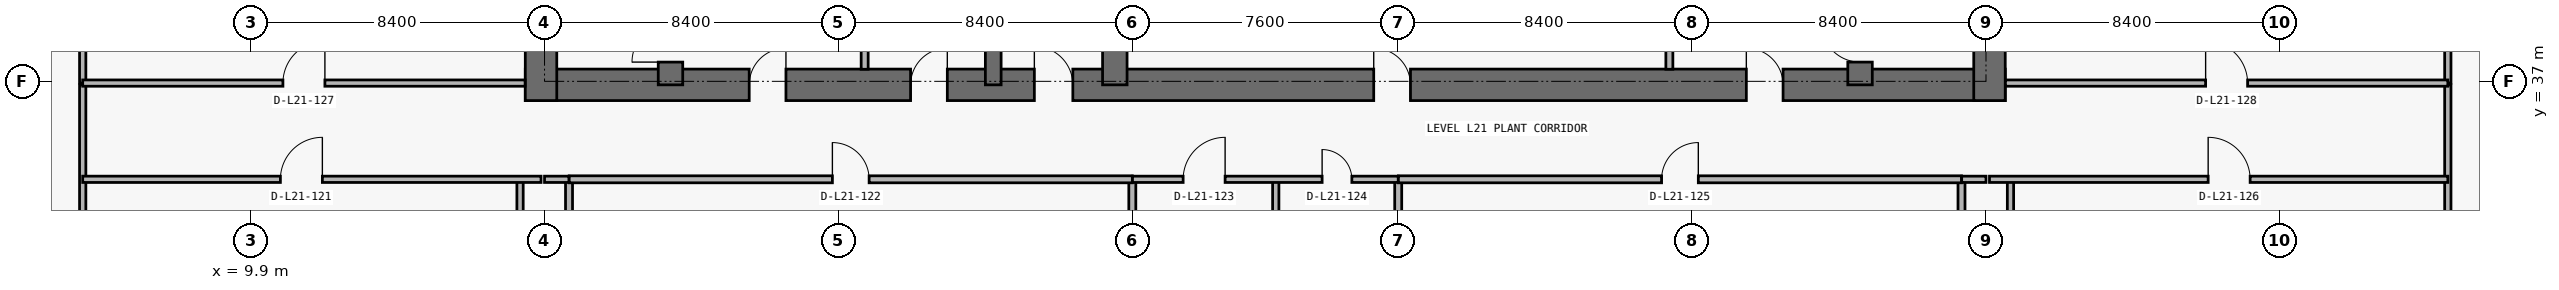
"""IFC4 building model, lengths in metres.
Left out: names, types, materials, properties, quantities, classifications, styles, units other than length and angle.
Written with IfcOpenShell. Run it as: python <this file> out.ifc"""

import sys

from ifc_helpers import new_model, si_unit, direction, frame, frame_2d, origin, place, context, subcontext, project, spatial, rectangle, extrude, element, fill, save


model = new_model("IFC4")
c1 = context("Model", 3, precision=1e-05, world=origin(), true_north=direction((0.0, 1.0)))
c2 = subcontext(c1, "Body", "Model", "MODEL_VIEW")
j1 = project(units=[si_unit("LENGTHUNIT", "METRE"), si_unit("PLANEANGLEUNIT", "RADIAN")], contexts=[c1])
p1 = place(None, origin())
s1 = spatial("IfcSite", under=j1, at=p1, CompositionType="ELEMENT")
p2 = place(p1, origin())
s2 = spatial("IfcBuilding", under=s1, at=p2, CompositionType="ELEMENT")
p3 = place(p2, frame((0.0, 0.0, 79.5)))
s3 = spatial("IfcBuildingStorey", under=s2, at=p3, CompositionType="ELEMENT", Elevation=79.5)
p4 = place(p3, frame((17.75, 36.9, 0.0), z_axis=(0.0, 0.0, 1.0), x_axis=(1.0, 0.0, 0.0)))
e1 = element("IfcWall", 1, at=p4, inside=s3, PredefinedType="SHEAR", context=c2, shape_type="SweptSolid", body=[
    extrude(rectangle(XDim=42.3, YDim=0.9, at=frame_2d((21.15, 0.0))), origin(), (0.0, 0.0, 1.0), 4.85),
])
p5 = place(p4, frame((14.55, 0.0, 0.0)))
e2 = element("IfcOpeningElement", 2, at=p5, cuts=e1, PredefinedType="OPENING", context=c2, shape_type="SweptSolid", body=[
    extrude(rectangle(XDim=1.1, YDim=2.15, at=frame_2d((0.55, 1.075))), frame((0.0, 0.46, 0.0), z_axis=(0.0, -1.0, 0.0), x_axis=(1.0, 0.0, 0.0)), (0.0, 0.0, 1.0), 0.92),
])
p6 = place(p4, frame((6.4, 0.0, 0.0)))
e3 = element("IfcOpeningElement", 3, at=p6, cuts=e1, PredefinedType="OPENING", context=c2, shape_type="SweptSolid", body=[
    extrude(rectangle(XDim=1.05, YDim=2.15, at=frame_2d((0.525, 1.075))), frame((0.0, 0.46, 0.0), z_axis=(0.0, -1.0, 0.0), x_axis=(1.0, 0.0, 0.0)), (0.0, 0.0, 1.0), 0.92),
])
p7 = place(p4, frame((34.9, 0.0, 0.0)))
e4 = element("IfcOpeningElement", 4, at=p7, cuts=e1, PredefinedType="OPENING", context=c2, shape_type="SweptSolid", body=[
    extrude(rectangle(XDim=1.05, YDim=2.15, at=frame_2d((0.525, 1.075))), frame((0.0, 0.46, 0.0), z_axis=(0.0, -1.0, 0.0), x_axis=(1.0, 0.0, 0.0)), (0.0, 0.0, 1.0), 0.92),
])
p8 = place(p4, frame((11.012, 0.0, 0.0)))
e5 = element("IfcOpeningElement", 5, at=p8, cuts=e1, PredefinedType="OPENING", context=c2, shape_type="SweptSolid", body=[
    extrude(rectangle(XDim=1.05, YDim=2.15, at=frame_2d((0.525, 1.075))), frame((0.0, 0.46, 0.0), z_axis=(0.0, -1.0, 0.0), x_axis=(1.0, 0.0, 0.0)), (0.0, 0.0, 1.0), 0.92),
])
p9 = place(p4, frame((24.25, 0.0, 0.0)))
e6 = element("IfcOpeningElement", 6, at=p9, cuts=e1, PredefinedType="OPENING", context=c2, shape_type="SweptSolid", body=[
    extrude(rectangle(XDim=1.05, YDim=2.15, at=frame_2d((0.525, 1.075))), frame((0.0, 0.46, 0.0), z_axis=(0.0, -1.0, 0.0), x_axis=(1.0, 0.0, 0.0)), (0.0, 0.0, 1.0), 0.92),
])
for number, where, z_axis, x_axis in (
    (7, (18.2, 36.45, 0.0), (0.0, 0.0, 1.0), (0.0, 1.0, 0.0)),
    (8, (59.6, 36.45, 0.0), (0.0, 0.0, 1.0), (0.0, 1.0, 0.0)),
):
    element("IfcWall", number, at=place(p3, frame(where, z_axis=z_axis, x_axis=x_axis)), inside=s3, PredefinedType="SHEAR", context=c2, shape_type="SweptSolid", body=[
        extrude(rectangle(XDim=14.15, YDim=0.9, at=frame_2d((7.075, 0.0))), origin(), (0.0, 0.0, 1.0), 4.85),
    ])
p10 = place(p3, frame((21.9, 36.9, 0.0), z_axis=(0.0, 0.0, 1.0), x_axis=(0.0, 1.0, 0.0)))
e9 = element("IfcWall", 9, at=p10, inside=s3, PredefinedType="SHEAR", context=c2, shape_type="SweptSolid", body=[
    extrude(rectangle(XDim=9.675, YDim=0.7, at=frame_2d((4.837, 0.0))), origin(), (0.0, 0.0, 1.0), 4.85),
])
p11 = place(p10, frame((0.65, 0.0, 0.0)))
e10 = element("IfcOpeningElement", 10, at=p11, cuts=e9, PredefinedType="OPENING", context=c2, shape_type="SweptSolid", body=[
    extrude(rectangle(XDim=1.1, YDim=2.15, at=frame_2d((0.55, 1.075))), frame((0.0, 0.36, 0.0), z_axis=(0.0, -1.0, 0.0), x_axis=(1.0, 0.0, 0.0)), (0.0, 0.0, 1.0), 0.72),
])
p12 = place(p3, frame((55.9, 36.9, 0.0), z_axis=(0.0, 0.0, 1.0), x_axis=(0.0, 1.0, 0.0)))
e11 = element("IfcWall", 11, at=p12, inside=s3, PredefinedType="SHEAR", context=c2, shape_type="SweptSolid", body=[
    extrude(rectangle(XDim=9.675, YDim=0.7, at=frame_2d((4.837, 0.0))), origin(), (0.0, 0.0, 1.0), 4.85),
])
p13 = place(p12, frame((0.65, 0.0, 0.0)))
e12 = element("IfcOpeningElement", 12, at=p13, cuts=e11, PredefinedType="OPENING", context=c2, shape_type="SweptSolid", body=[
    extrude(rectangle(XDim=1.1, YDim=2.15, at=frame_2d((0.55, 1.075))), frame((0.0, 0.36, 0.0), z_axis=(0.0, -1.0, 0.0), x_axis=(1.0, 0.0, 0.0)), (0.0, 0.0, 1.0), 0.72),
])
p14 = place(p3, frame((31.125, 36.9, 0.0), z_axis=(0.0, 0.0, 1.0), x_axis=(0.0, 1.0, 0.0)))
e13 = element("IfcWall", 13, at=p14, inside=s3, PredefinedType="SHEAR", context=c2, shape_type="SweptSolid", body=[
    extrude(rectangle(XDim=9.675, YDim=0.45, at=frame_2d((4.837, 0.0))), origin(), (0.0, 0.0, 1.0), 4.85),
])
p15 = place(p3, frame((34.6, 36.9, 0.0), z_axis=(0.0, 0.0, 1.0), x_axis=(0.0, 1.0, 0.0)))
e14 = element("IfcWall", 14, at=p15, inside=s3, PredefinedType="SHEAR", context=c2, shape_type="SweptSolid", body=[
    extrude(rectangle(XDim=9.675, YDim=0.7, at=frame_2d((4.837, 0.0))), origin(), (0.0, 0.0, 1.0), 4.85),
])
p16 = place(p3, frame((5.1, 12.9, 0.0), z_axis=(0.0, 0.0, 1.0), x_axis=(0.0, 1.0, 0.0)))
e15 = element("IfcWall", 15, at=p16, inside=s3, PredefinedType="PARTITIONING", context=c2, shape_type="SweptSolid", body=[
    extrude(rectangle(XDim=24.0, YDim=0.18, at=frame_2d((12.0, 0.0))), origin(), (0.0, 0.0, 1.0), 4.85),
])
p17 = place(p3, frame((5.1, 36.95, 0.0), z_axis=(0.0, 0.0, 1.0), x_axis=(0.0, 1.0, 0.0)))
e16 = element("IfcWall", 16, at=p17, inside=s3, PredefinedType="PARTITIONING", context=c2, shape_type="SweptSolid", body=[
    extrude(rectangle(XDim=10.33, YDim=0.18, at=frame_2d((5.165, 0.0))), origin(), (0.0, 0.0, 1.0), 4.85),
])
p18 = place(p3, frame((17.6, 12.9, 0.0), z_axis=(0.0, 0.0, 1.0), x_axis=(0.0, 1.0, 0.0)))
e17 = element("IfcWall", 17, at=p18, inside=s3, PredefinedType="PARTITIONING", context=c2, shape_type="SweptSolid", body=[
    extrude(rectangle(XDim=21.3, YDim=0.18, at=frame_2d((10.65, 0.0))), origin(), (0.0, 0.0, 1.0), 4.85),
])
p19 = place(p3, frame((19.0, 12.9, 0.0), z_axis=(0.0, 0.0, 1.0), x_axis=(0.0, 1.0, 0.0)))
e18 = element("IfcWall", 18, at=p19, inside=s3, PredefinedType="PARTITIONING", context=c2, shape_type="SweptSolid", body=[
    extrude(rectangle(XDim=21.3, YDim=0.2, at=frame_2d((10.65, 0.0))), origin(), (0.0, 0.0, 1.0), 4.85),
])
p20 = place(p3, frame((27.45, 37.345, 0.0), z_axis=(0.0, 0.0, 1.0), x_axis=(0.0, 1.0, 0.0)))
e19 = element("IfcWall", 19, at=p20, inside=s3, PredefinedType="PARTITIONING", context=c2, shape_type="SweptSolid", body=[
    extrude(rectangle(XDim=5.385, YDim=0.2, at=frame_2d((2.692, 0.0))), origin(), (0.0, 0.0, 1.0), 4.85),
])
p21 = place(p3, frame((35.1, 12.9, 0.0), z_axis=(0.0, 0.0, 1.0), x_axis=(0.0, 1.0, 0.0)))
e20 = element("IfcWall", 20, at=p21, inside=s3, PredefinedType="PARTITIONING", context=c2, shape_type="SweptSolid", body=[
    extrude(rectangle(XDim=21.3, YDim=0.2, at=frame_2d((10.65, 0.0))), origin(), (0.0, 0.0, 1.0), 3.814),
])
p22 = place(p3, frame((39.2, 29.4, 0.0), z_axis=(0.0, 0.0, 1.0), x_axis=(0.0, 1.0, 0.0)))
e21 = element("IfcWall", 21, at=p22, inside=s3, PredefinedType="PARTITIONING", context=c2, shape_type="SweptSolid", body=[
    extrude(rectangle(XDim=4.8, YDim=0.18, at=frame_2d((2.4, 0.0))), origin(), (0.0, 0.0, 1.0), 4.85),
])
p23 = place(p3, frame((42.7, 12.9, 0.0), z_axis=(0.0, 0.0, 1.0), x_axis=(0.0, 1.0, 0.0)))
e22 = element("IfcWall", 22, at=p23, inside=s3, PredefinedType="PARTITIONING", context=c2, shape_type="SweptSolid", body=[
    extrude(rectangle(XDim=21.3, YDim=0.2, at=frame_2d((10.65, 0.0))), origin(), (0.0, 0.0, 1.0), 3.814),
])
p24 = place(p3, frame((50.45, 37.345, 0.0), z_axis=(0.0, 0.0, 1.0), x_axis=(0.0, 1.0, 0.0)))
e23 = element("IfcWall", 23, at=p24, inside=s3, PredefinedType="PARTITIONING", context=c2, shape_type="SweptSolid", body=[
    extrude(rectangle(XDim=5.385, YDim=0.2, at=frame_2d((2.692, 0.0))), origin(), (0.0, 0.0, 1.0), 4.85),
])
p25 = place(p3, frame((58.8, 12.9, 0.0), z_axis=(0.0, 0.0, 1.0), x_axis=(0.0, 1.0, 0.0)))
e24 = element("IfcWall", 24, at=p25, inside=s3, PredefinedType="PARTITIONING", context=c2, shape_type="SweptSolid", body=[
    extrude(rectangle(XDim=21.3, YDim=0.2, at=frame_2d((10.65, 0.0))), origin(), (0.0, 0.0, 1.0), 4.85),
])
p26 = place(p3, frame((60.2, 12.9, 0.0), z_axis=(0.0, 0.0, 1.0), x_axis=(0.0, 1.0, 0.0)))
e25 = element("IfcWall", 25, at=p26, inside=s3, PredefinedType="PARTITIONING", context=c2, shape_type="SweptSolid", body=[
    extrude(rectangle(XDim=21.3, YDim=0.18, at=frame_2d((10.65, 0.0))), origin(), (0.0, 0.0, 1.0), 4.85),
])
p27 = place(p3, frame((72.7, 12.9, 0.0), z_axis=(0.0, 0.0, 1.0), x_axis=(0.0, 1.0, 0.0)))
e26 = element("IfcWall", 26, at=p27, inside=s3, PredefinedType="PARTITIONING", context=c2, shape_type="SweptSolid", body=[
    extrude(rectangle(XDim=24.0, YDim=0.18, at=frame_2d((12.0, 0.0))), origin(), (0.0, 0.0, 1.0), 4.85),
])
p28 = place(p3, frame((72.7, 36.95, 0.0), z_axis=(0.0, 0.0, 1.0), x_axis=(0.0, 1.0, 0.0)))
e27 = element("IfcWall", 27, at=p28, inside=s3, PredefinedType="PARTITIONING", context=c2, shape_type="SweptSolid", body=[
    extrude(rectangle(XDim=10.33, YDim=0.18, at=frame_2d((5.165, 0.0))), origin(), (0.0, 0.0, 1.0), 4.85),
])
p29 = place(p3, frame((5.1, 34.2, 0.0), z_axis=(0.0, 0.0, 1.0), x_axis=(1.0, 0.0, 0.0)))
e28 = element("IfcWall", 28, at=p29, inside=s3, PredefinedType="PARTITIONING", context=c2, shape_type="SweptSolid", body=[
    extrude(rectangle(XDim=13.1, YDim=0.18, at=frame_2d((6.55, 0.0))), origin(), (0.0, 0.0, 1.0), 4.85),
])
p30 = place(p29, frame((5.65, 0.0, 0.0)))
e29 = element("IfcOpeningElement", 29, at=p30, cuts=e28, PredefinedType="OPENING", context=c2, shape_type="SweptSolid", body=[
    extrude(rectangle(XDim=1.2, YDim=2.2, at=frame_2d((0.6, 1.1))), frame((0.0, 0.1, 0.0), z_axis=(0.0, -1.0, 0.0), x_axis=(1.0, 0.0, 0.0)), (0.0, 0.0, 1.0), 0.2),
])
p31 = place(p3, frame((18.3, 34.2, 0.0), z_axis=(0.0, 0.0, 1.0), x_axis=(1.0, 0.0, 0.0)))
e30 = element("IfcWall", 30, at=p31, inside=s3, PredefinedType="PARTITIONING", context=c2, shape_type="SweptSolid", body=[
    extrude(rectangle(XDim=0.7, YDim=0.18, at=frame_2d((0.35, 0.0))), origin(), (0.0, 0.0, 1.0), 4.85),
])
p32 = place(p3, frame((19.005, 34.2, 0.0), z_axis=(0.0, 0.0, 1.0), x_axis=(1.0, 0.0, 0.0)))
e31 = element("IfcWall", 31, at=p32, inside=s3, PredefinedType="PARTITIONING", context=c2, shape_type="SweptSolid", body=[
    extrude(rectangle(XDim=16.095, YDim=0.2, at=frame_2d((8.048, 0.0))), origin(), (0.0, 0.0, 1.0), 4.85),
])
p33 = place(p32, frame((7.522, 0.0, 0.0)))
e32 = element("IfcOpeningElement", 32, at=p33, cuts=e31, PredefinedType="OPENING", context=c2, shape_type="SweptSolid", body=[
    extrude(rectangle(XDim=1.05, YDim=2.15, at=frame_2d((0.525, 1.075))), frame((0.0, 0.11, 0.0), z_axis=(0.0, -1.0, 0.0), x_axis=(1.0, 0.0, 0.0)), (0.0, 0.0, 1.0), 0.22),
])
p34 = place(p3, frame((35.105, 34.2, 0.0), z_axis=(0.0, 0.0, 1.0), x_axis=(1.0, 0.0, 0.0)))
e33 = element("IfcWall", 33, at=p34, inside=s3, PredefinedType="PARTITIONING", context=c2, shape_type="SweptSolid", body=[
    extrude(rectangle(XDim=7.595, YDim=0.18, at=frame_2d((3.797, 0.0))), origin(), (0.0, 0.0, 1.0), 4.85),
])
p35 = place(p34, frame((1.448, 0.0, 0.0)))
e34 = element("IfcOpeningElement", 34, at=p35, cuts=e33, PredefinedType="OPENING", context=c2, shape_type="SweptSolid", body=[
    extrude(rectangle(XDim=1.2, YDim=2.2, at=frame_2d((0.6, 1.1))), frame((0.0, 0.1, 0.0), z_axis=(0.0, -1.0, 0.0), x_axis=(1.0, 0.0, 0.0)), (0.0, 0.0, 1.0), 0.2),
])
p36 = place(p34, frame((5.42, 0.0, 0.0)))
e35 = element("IfcOpeningElement", 35, at=p36, cuts=e33, PredefinedType="OPENING", context=c2, shape_type="SweptSolid", body=[
    extrude(rectangle(XDim=0.85, YDim=2.1, at=frame_2d((0.425, 1.05))), frame((0.0, 0.1, 0.0), z_axis=(0.0, -1.0, 0.0), x_axis=(1.0, 0.0, 0.0)), (0.0, 0.0, 1.0), 0.2),
])
p37 = place(p3, frame((42.705, 34.2, 0.0), z_axis=(0.0, 0.0, 1.0), x_axis=(1.0, 0.0, 0.0)))
e36 = element("IfcWall", 36, at=p37, inside=s3, PredefinedType="PARTITIONING", context=c2, shape_type="SweptSolid", body=[
    extrude(rectangle(XDim=16.095, YDim=0.2, at=frame_2d((8.047, 0.0))), origin(), (0.0, 0.0, 1.0), 4.85),
])
p38 = place(p37, frame((7.522, 0.0, 0.0)))
e37 = element("IfcOpeningElement", 37, at=p38, cuts=e36, PredefinedType="OPENING", context=c2, shape_type="SweptSolid", body=[
    extrude(rectangle(XDim=1.05, YDim=2.15, at=frame_2d((0.525, 1.075))), frame((0.0, 0.11, 0.0), z_axis=(0.0, -1.0, 0.0), x_axis=(1.0, 0.0, 0.0)), (0.0, 0.0, 1.0), 0.22),
])
p39 = place(p3, frame((58.805, 34.2, 0.0), z_axis=(0.0, 0.0, 1.0), x_axis=(1.0, 0.0, 0.0)))
e38 = element("IfcWall", 38, at=p39, inside=s3, PredefinedType="PARTITIONING", context=c2, shape_type="SweptSolid", body=[
    extrude(rectangle(XDim=0.695, YDim=0.18, at=frame_2d((0.348, 0.0))), origin(), (0.0, 0.0, 1.0), 4.85),
])
p40 = place(p3, frame((59.6, 34.2, 0.0), z_axis=(0.0, 0.0, 1.0), x_axis=(1.0, 0.0, 0.0)))
e39 = element("IfcWall", 39, at=p40, inside=s3, PredefinedType="PARTITIONING", context=c2, shape_type="SweptSolid", body=[
    extrude(rectangle(XDim=13.1, YDim=0.18, at=frame_2d((6.55, 0.0))), origin(), (0.0, 0.0, 1.0), 4.85),
])
p41 = place(p40, frame((6.25, 0.0, 0.0)))
e40 = element("IfcOpeningElement", 40, at=p41, cuts=e39, PredefinedType="OPENING", context=c2, shape_type="SweptSolid", body=[
    extrude(rectangle(XDim=1.2, YDim=2.2, at=frame_2d((0.6, 1.1))), frame((0.0, 0.1, 0.0), z_axis=(0.0, -1.0, 0.0), x_axis=(1.0, 0.0, 0.0)), (0.0, 0.0, 1.0), 0.2),
])
p42 = place(p3, frame((5.1, 36.95, 0.0), z_axis=(0.0, 0.0, 1.0), x_axis=(1.0, 0.0, 0.0)))
e41 = element("IfcWall", 41, at=p42, inside=s3, PredefinedType="PARTITIONING", context=c2, shape_type="SweptSolid", body=[
    extrude(rectangle(XDim=12.645, YDim=0.18, at=frame_2d((6.323, 0.0))), origin(), (0.0, 0.0, 1.0), 4.85),
])
p43 = place(p42, frame((5.722, 0.0, 0.0)))
e42 = element("IfcOpeningElement", 42, at=p43, cuts=e41, PredefinedType="OPENING", context=c2, shape_type="SweptSolid", body=[
    extrude(rectangle(XDim=1.2, YDim=2.2, at=frame_2d((0.6, 1.1))), frame((0.0, 0.1, 0.0), z_axis=(0.0, -1.0, 0.0), x_axis=(1.0, 0.0, 0.0)), (0.0, 0.0, 1.0), 0.2),
])
p44 = place(p3, frame((60.055, 36.95, 0.0), z_axis=(0.0, 0.0, 1.0), x_axis=(1.0, 0.0, 0.0)))
e43 = element("IfcWall", 43, at=p44, inside=s3, PredefinedType="PARTITIONING", context=c2, shape_type="SweptSolid", body=[
    extrude(rectangle(XDim=12.645, YDim=0.18, at=frame_2d((6.323, 0.0))), origin(), (0.0, 0.0, 1.0), 4.85),
])
p45 = place(p44, frame((5.722, 0.0, 0.0)))
e44 = element("IfcOpeningElement", 44, at=p45, cuts=e43, PredefinedType="OPENING", context=c2, shape_type="SweptSolid", body=[
    extrude(rectangle(XDim=1.2, YDim=2.2, at=frame_2d((0.6, 1.1))), frame((0.0, 0.1, 0.0), z_axis=(0.0, -1.0, 0.0), x_axis=(1.0, 0.0, 0.0)), (0.0, 0.0, 1.0), 0.2),
])
p46 = place(p5, origin())
e45 = element("IfcDoor", 45, at=p46, inside=s3, OperationType="SINGLE_SWING_LEFT", PredefinedType="DOOR", context=c2, shape_type="SweptSolid", body=[
    extrude(rectangle(XDim=1.1, YDim=2.15, at=frame_2d((0.55, 1.075))), frame((0.0, 0.025, 0.0), z_axis=(0.0, -1.0, 0.0), x_axis=(1.0, 0.0, 0.0)), (0.0, 0.0, 1.0), 0.05),
])
fill(e2, e45)
p47 = place(p6, origin())
e46 = element("IfcDoor", 46, at=p47, inside=s3, OperationType="SINGLE_SWING_RIGHT", PredefinedType="DOOR", context=c2, shape_type="SweptSolid", body=[
    extrude(rectangle(XDim=1.05, YDim=2.15, at=frame_2d((0.525, 1.075))), frame((0.0, 0.025, 0.0), z_axis=(0.0, -1.0, 0.0), x_axis=(1.0, 0.0, 0.0)), (0.0, 0.0, 1.0), 0.05),
])
fill(e3, e46)
p48 = place(p11, origin())
e47 = element("IfcDoor", 47, at=p48, inside=s3, OperationType="SINGLE_SWING_LEFT", PredefinedType="DOOR", context=c2, shape_type="SweptSolid", body=[
    extrude(rectangle(XDim=1.1, YDim=2.15, at=frame_2d((0.55, 1.075))), frame((0.0, 0.025, 0.0), z_axis=(0.0, -1.0, 0.0), x_axis=(1.0, 0.0, 0.0)), (0.0, 0.0, 1.0), 0.05),
])
fill(e10, e47)
p49 = place(p7, origin())
e48 = element("IfcDoor", 48, at=p49, inside=s3, OperationType="SINGLE_SWING_LEFT", PredefinedType="DOOR", context=c2, shape_type="SweptSolid", body=[
    extrude(rectangle(XDim=1.05, YDim=2.15, at=frame_2d((0.525, 1.075))), frame((0.0, 0.025, 0.0), z_axis=(0.0, -1.0, 0.0), x_axis=(1.0, 0.0, 0.0)), (0.0, 0.0, 1.0), 0.05),
])
fill(e4, e48)
p50 = place(p13, origin())
e49 = element("IfcDoor", 49, at=p50, inside=s3, OperationType="SINGLE_SWING_RIGHT", PredefinedType="DOOR", context=c2, shape_type="SweptSolid", body=[
    extrude(rectangle(XDim=1.1, YDim=2.15, at=frame_2d((0.55, 1.075))), frame((0.0, 0.025, 0.0), z_axis=(0.0, -1.0, 0.0), x_axis=(1.0, 0.0, 0.0)), (0.0, 0.0, 1.0), 0.05),
])
fill(e12, e49)
p51 = place(p8, origin())
e50 = element("IfcDoor", 50, at=p51, inside=s3, OperationType="SINGLE_SWING_RIGHT", PredefinedType="DOOR", context=c2, shape_type="SweptSolid", body=[
    extrude(rectangle(XDim=1.05, YDim=2.15, at=frame_2d((0.525, 1.075))), frame((0.0, 0.025, 0.0), z_axis=(0.0, -1.0, 0.0), x_axis=(1.0, 0.0, 0.0)), (0.0, 0.0, 1.0), 0.05),
])
fill(e5, e50)
p52 = place(p9, origin())
e51 = element("IfcDoor", 51, at=p52, inside=s3, OperationType="SINGLE_SWING_LEFT", PredefinedType="DOOR", context=c2, shape_type="SweptSolid", body=[
    extrude(rectangle(XDim=1.05, YDim=2.15, at=frame_2d((0.525, 1.075))), frame((0.0, 0.025, 0.0), z_axis=(0.0, -1.0, 0.0), x_axis=(1.0, 0.0, 0.0)), (0.0, 0.0, 1.0), 0.05),
])
fill(e6, e51)
p53 = place(p30, origin())
e52 = element("IfcDoor", 52, at=p53, inside=s3, OperationType="SINGLE_SWING_RIGHT", PredefinedType="DOOR", context=c2, shape_type="SweptSolid", body=[
    extrude(rectangle(XDim=1.2, YDim=2.2, at=frame_2d((0.6, 1.1))), frame((0.0, 0.025, 0.0), z_axis=(0.0, -1.0, 0.0), x_axis=(1.0, 0.0, 0.0)), (0.0, 0.0, 1.0), 0.05),
])
fill(e29, e52)
p54 = place(p33, origin())
e53 = element("IfcDoor", 53, at=p54, inside=s3, OperationType="SINGLE_SWING_LEFT", PredefinedType="DOOR", context=c2, shape_type="SweptSolid", body=[
    extrude(rectangle(XDim=1.05, YDim=2.15, at=frame_2d((0.525, 1.075))), frame((0.0, 0.025, 0.0), z_axis=(0.0, -1.0, 0.0), x_axis=(1.0, 0.0, 0.0)), (0.0, 0.0, 1.0), 0.05),
])
fill(e32, e53)
p55 = place(p35, origin())
e54 = element("IfcDoor", 54, at=p55, inside=s3, OperationType="SINGLE_SWING_RIGHT", PredefinedType="DOOR", context=c2, shape_type="SweptSolid", body=[
    extrude(rectangle(XDim=1.2, YDim=2.2, at=frame_2d((0.6, 1.1))), frame((0.0, 0.025, 0.0), z_axis=(0.0, -1.0, 0.0), x_axis=(1.0, 0.0, 0.0)), (0.0, 0.0, 1.0), 0.05),
])
fill(e34, e54)
p56 = place(p36, origin())
e55 = element("IfcDoor", 55, at=p56, inside=s3, OperationType="SINGLE_SWING_LEFT", PredefinedType="DOOR", context=c2, shape_type="SweptSolid", body=[
    extrude(rectangle(XDim=0.85, YDim=2.1, at=frame_2d((0.425, 1.05))), frame((0.0, 0.025, 0.0), z_axis=(0.0, -1.0, 0.0), x_axis=(1.0, 0.0, 0.0)), (0.0, 0.0, 1.0), 0.05),
])
fill(e35, e55)
p57 = place(p38, origin())
e56 = element("IfcDoor", 56, at=p57, inside=s3, OperationType="SINGLE_SWING_RIGHT", PredefinedType="DOOR", context=c2, shape_type="SweptSolid", body=[
    extrude(rectangle(XDim=1.05, YDim=2.15, at=frame_2d((0.525, 1.075))), frame((0.0, 0.025, 0.0), z_axis=(0.0, -1.0, 0.0), x_axis=(1.0, 0.0, 0.0)), (0.0, 0.0, 1.0), 0.05),
])
fill(e37, e56)
p58 = place(p41, origin())
e57 = element("IfcDoor", 57, at=p58, inside=s3, OperationType="SINGLE_SWING_LEFT", PredefinedType="DOOR", context=c2, shape_type="SweptSolid", body=[
    extrude(rectangle(XDim=1.2, YDim=2.2, at=frame_2d((0.6, 1.1))), frame((0.0, 0.025, 0.0), z_axis=(0.0, -1.0, 0.0), x_axis=(1.0, 0.0, 0.0)), (0.0, 0.0, 1.0), 0.05),
])
fill(e40, e57)
p59 = place(p43, origin())
e58 = element("IfcDoor", 58, at=p59, inside=s3, OperationType="SINGLE_SWING_RIGHT", PredefinedType="DOOR", context=c2, shape_type="SweptSolid", body=[
    extrude(rectangle(XDim=1.2, YDim=2.2, at=frame_2d((0.6, 1.1))), frame((0.0, 0.025, 0.0), z_axis=(0.0, -1.0, 0.0), x_axis=(1.0, 0.0, 0.0)), (0.0, 0.0, 1.0), 0.05),
])
fill(e42, e58)
p60 = place(p45, origin())
e59 = element("IfcDoor", 59, at=p60, inside=s3, OperationType="SINGLE_SWING_LEFT", PredefinedType="DOOR", context=c2, shape_type="SweptSolid", body=[
    extrude(rectangle(XDim=1.2, YDim=2.2, at=frame_2d((0.6, 1.1))), frame((0.0, 0.025, 0.0), z_axis=(0.0, -1.0, 0.0), x_axis=(1.0, 0.0, 0.0)), (0.0, 0.0, 1.0), 0.05),
])
fill(e44, e59)
save(model, sys.argv[1])
